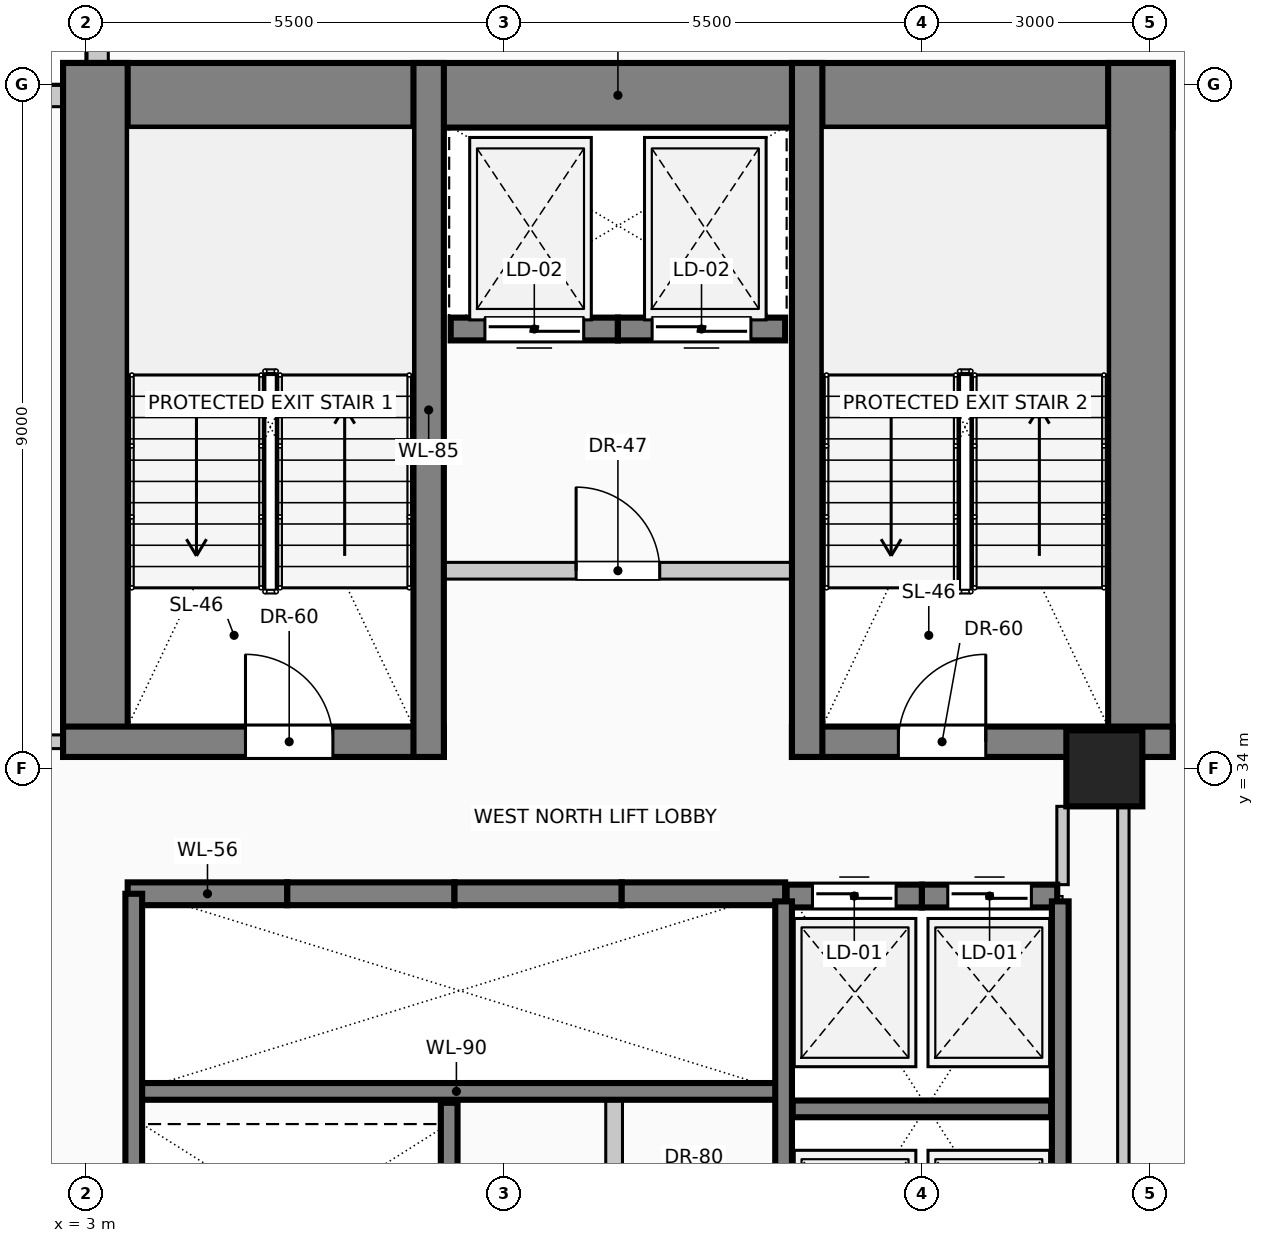
"""IFC4 building model, lengths in metres.
Left out: names, types, materials, properties, quantities, classifications, styles, units other than length and angle.
Written with IfcOpenShell. Run it as: python <this file> out.ifc"""

import sys

from ifc_helpers import new_model, si_unit, direction, frame, frame_2d, origin, origin_2d, place, context, subcontext, project, spatial, rectangle, circle, extrude, element, fill, save


model = new_model("IFC4")
c1 = context("Model", 3, precision=1e-05, world=origin(), true_north=direction((0.0, 1.0)))
c2 = subcontext(c1, "Body", "Model", "MODEL_VIEW")
j1 = project(units=[si_unit("LENGTHUNIT", "METRE"), si_unit("PLANEANGLEUNIT", "RADIAN")], contexts=[c1])
p1 = place(None, origin())
s1 = spatial("IfcSite", under=j1, at=p1, CompositionType="ELEMENT")
p2 = place(p1, origin())
s2 = spatial("IfcBuilding", under=s1, at=p2, CompositionType="ELEMENT")
p3 = place(p2, frame((0.0, 0.0, 148.6)))
s3 = spatial("IfcBuildingStorey", under=s2, at=p3, CompositionType="ELEMENT", Elevation=148.6)
p4 = place(p3, frame((2.7, 42.855, 0.0), z_axis=(0.0, 0.0, 1.0), x_axis=(1.0, 0.0, 0.0)))
e1 = element("IfcWall", 1, at=p4, inside=s3, PredefinedType="SHEAR", context=c2, shape_type="SweptSolid", body=[
    extrude(rectangle(XDim=14.6, YDim=0.85, at=frame_2d((7.3, 0.0))), origin(), (0.0, 0.0, 1.0), 4.0),
])
for number, where, z_axis, x_axis in (
    (2, (3.125, 34.15, 0.0), (0.0, 0.0, 1.0), (0.0, 1.0, 0.0)),
    (3, (16.875, 34.15, 0.0), (0.0, 0.0, 1.0), (0.0, 1.0, 0.0)),
):
    element("IfcWall", number, at=place(p3, frame(where, z_axis=z_axis, x_axis=x_axis)), inside=s3, PredefinedType="SHEAR", context=c2, shape_type="SweptSolid", body=[
        extrude(rectangle(XDim=9.13, YDim=0.85, at=frame_2d((4.565, 0.0))), origin(), (0.0, 0.0, 1.0), 4.0),
    ])
p5 = place(p3, frame((2.7, 34.35, 0.0), z_axis=(0.0, 0.0, 1.0), x_axis=(1.0, 0.0, 0.0)))
e4 = element("IfcWall", 4, at=p5, inside=s3, PredefinedType="SHEAR", context=c2, shape_type="SweptSolid", body=[
    extrude(rectangle(XDim=5.01, YDim=0.4, at=frame_2d((2.505, 0.0))), origin(), (0.0, 0.0, 1.0), 4.0),
])
p6 = place(p5, frame((2.4, 0.0, 0.0)))
e5 = element("IfcOpeningElement", 5, at=p6, cuts=e4, PredefinedType="OPENING", context=c2, shape_type="SweptSolid", body=[
    extrude(rectangle(XDim=1.15, YDim=2.2, at=frame_2d((0.575, 1.1))), frame((0.0, 0.21, 0.0), z_axis=(0.0, -1.0, 0.0), x_axis=(1.0, 0.0, 0.0)), (0.0, 0.0, 1.0), 0.42),
])
p7 = place(p3, frame((12.29, 34.35, 0.0), z_axis=(0.0, 0.0, 1.0), x_axis=(1.0, 0.0, 0.0)))
e6 = element("IfcWall", 6, at=p7, inside=s3, PredefinedType="SHEAR", context=c2, shape_type="SweptSolid", body=[
    extrude(rectangle(XDim=5.01, YDim=0.4, at=frame_2d((2.505, 0.0))), origin(), (0.0, 0.0, 1.0), 4.0),
])
p8 = place(p7, frame((1.4, 0.0, 0.0)))
e7 = element("IfcOpeningElement", 7, at=p8, cuts=e6, PredefinedType="OPENING", context=c2, shape_type="SweptSolid", body=[
    extrude(rectangle(XDim=1.15, YDim=2.2, at=frame_2d((0.575, 1.1))), frame((0.0, 0.21, 0.0), z_axis=(0.0, -1.0, 0.0), x_axis=(1.0, 0.0, 0.0)), (0.0, 0.0, 1.0), 0.42),
])
for number, where, z_axis, x_axis in (
    (8, (7.51, 34.15, 0.0), (0.0, 0.0, 1.0), (0.0, 1.0, 0.0)),
    (9, (12.49, 34.15, 0.0), (0.0, 0.0, 1.0), (0.0, 1.0, 0.0)),
):
    element("IfcWall", number, at=place(p3, frame(where, z_axis=z_axis, x_axis=x_axis)), inside=s3, PredefinedType="SHEAR", context=c2, shape_type="SweptSolid", body=[
        extrude(rectangle(XDim=9.13, YDim=0.4, at=frame_2d((4.565, 0.0))), origin(), (0.0, 0.0, 1.0), 4.0),
    ])
p9 = place(p3, frame((16.4, 34.0, 0.0), z_axis=(0.0, 0.0, 1.0), x_axis=(1.0, 0.0, 0.0)))
e10 = element("IfcColumn", 10, at=p9, inside=s3, PredefinedType="COLUMN", context=c2, shape_type="SweptSolid", body=[
    extrude(circle(Radius=0.5, at=origin_2d()), origin(), (0.0, 0.0, 1.0), 4.0),
])
p10 = place(p3, frame((0.6, 42.845, 0.0), z_axis=(0.0, 0.0, 1.0), x_axis=(1.0, 0.0, 0.0)))
e11 = element("IfcWall", 11, at=p10, inside=s3, PredefinedType="SOLIDWALL", context=c2, shape_type="SweptSolid", body=[
    extrude(rectangle(XDim=2.095, YDim=0.28, at=frame_2d((1.047, 0.0))), origin(), (0.0, 0.0, 1.0), 3.725),
])
p11 = place(p3, frame((3.155, 43.285, 0.0), z_axis=(0.0, 0.0, 1.0), x_axis=(0.0, 1.0, 0.0)))
e12 = element("IfcWall", 12, at=p11, inside=s3, PredefinedType="SOLIDWALL", context=c2, shape_type="SweptSolid", body=[
    extrude(rectangle(XDim=2.115, YDim=0.28, at=frame_2d((1.058, 0.0))), origin(), (0.0, 0.0, 1.0), 3.725),
])
p12 = place(p3, frame((12.22, 32.32, 0.0), z_axis=(0.0, 0.0, 1.0), x_axis=(1.0, 0.0, 0.0)))
e13 = element("IfcWall", 13, at=p12, inside=s3, PredefinedType="SOLIDWALL", context=c2, shape_type="SweptSolid", body=[
    extrude(rectangle(XDim=1.78, YDim=0.3, at=frame_2d((0.89, 0.0))), origin(), (0.0, 0.0, 1.0), 4.0),
])
p13 = place(p12, frame((0.34, 0.0, 0.0)))
e14 = element("IfcOpeningElement", 14, at=p13, cuts=e13, PredefinedType="OPENING", context=c2, shape_type="SweptSolid", body=[
    extrude(rectangle(XDim=1.1, YDim=2.2, at=frame_2d((0.55, 1.1))), frame((0.0, 0.16, 0.0), z_axis=(0.0, -1.0, 0.0), x_axis=(1.0, 0.0, 0.0)), (0.0, 0.0, 1.0), 0.32),
])
p14 = place(p3, frame((14.0, 32.32, 0.0), z_axis=(0.0, 0.0, 1.0), x_axis=(1.0, 0.0, 0.0)))
e15 = element("IfcWall", 15, at=p14, inside=s3, PredefinedType="SOLIDWALL", context=c2, shape_type="SweptSolid", body=[
    extrude(rectangle(XDim=1.78, YDim=0.3, at=frame_2d((0.89, 0.0))), origin(), (0.0, 0.0, 1.0), 4.0),
])
p15 = place(p14, frame((0.34, 0.0, 0.0)))
e16 = element("IfcOpeningElement", 16, at=p15, cuts=e15, PredefinedType="OPENING", context=c2, shape_type="SweptSolid", body=[
    extrude(rectangle(XDim=1.1, YDim=2.2, at=frame_2d((0.55, 1.1))), frame((0.0, 0.16, 0.0), z_axis=(0.0, -1.0, 0.0), x_axis=(1.0, 0.0, 0.0)), (0.0, 0.0, 1.0), 0.32),
])
p16 = place(p3, frame((3.55, 32.35, 0.0), z_axis=(0.0, 0.0, 1.0), x_axis=(1.0, 0.0, 0.0)))
e17 = element("IfcWall", 17, at=p16, inside=s3, PredefinedType="SOLIDWALL", context=c2, shape_type="SweptSolid", body=[
    extrude(rectangle(XDim=2.1, YDim=0.3, at=frame_2d((1.05, 0.0))), origin(), (0.0, 0.0, 1.0), 4.0),
])
p17 = place(p3, frame((5.65, 32.35, 0.0), z_axis=(0.0, 0.0, 1.0), x_axis=(1.0, 0.0, 0.0)))
e18 = element("IfcWall", 18, at=p17, inside=s3, PredefinedType="SOLIDWALL", context=c2, shape_type="SweptSolid", body=[
    extrude(rectangle(XDim=2.2, YDim=0.3, at=frame_2d((1.1, 0.0))), origin(), (0.0, 0.0, 1.0), 4.0),
])
p18 = place(p3, frame((7.85, 32.35, 0.0), z_axis=(0.0, 0.0, 1.0), x_axis=(1.0, 0.0, 0.0)))
e19 = element("IfcWall", 19, at=p18, inside=s3, PredefinedType="SOLIDWALL", context=c2, shape_type="SweptSolid", body=[
    extrude(rectangle(XDim=2.2, YDim=0.3, at=frame_2d((1.1, 0.0))), origin(), (0.0, 0.0, 1.0), 4.0),
])
p19 = place(p3, frame((10.05, 32.35, 0.0), z_axis=(0.0, 0.0, 1.0), x_axis=(1.0, 0.0, 0.0)))
e20 = element("IfcWall", 20, at=p19, inside=s3, PredefinedType="SOLIDWALL", context=c2, shape_type="SweptSolid", body=[
    extrude(rectangle(XDim=2.15, YDim=0.3, at=frame_2d((1.075, 0.0))), origin(), (0.0, 0.0, 1.0), 4.0),
])
p20 = place(p3, frame((10.0, 39.78, 0.0), z_axis=(0.0, 0.0, 1.0), x_axis=(-1.0, 0.0, 0.0)))
e21 = element("IfcWall", 21, at=p20, inside=s3, PredefinedType="SOLIDWALL", context=c2, shape_type="SweptSolid", body=[
    extrude(rectangle(XDim=2.2, YDim=0.3, at=frame_2d((1.1, 0.0))), origin(), (0.0, 0.0, 1.0), 4.0),
])
p21 = place(p20, frame((0.45, 0.0, 0.0)))
e22 = element("IfcOpeningElement", 22, at=p21, cuts=e21, PredefinedType="OPENING", context=c2, shape_type="SweptSolid", body=[
    extrude(rectangle(XDim=1.3, YDim=2.25, at=frame_2d((0.65, 1.125))), frame((0.0, 0.16, 0.0), z_axis=(0.0, -1.0, 0.0), x_axis=(1.0, 0.0, 0.0)), (0.0, 0.0, 1.0), 0.32),
])
p22 = place(p3, frame((12.2, 39.78, 0.0), z_axis=(0.0, 0.0, 1.0), x_axis=(-1.0, 0.0, 0.0)))
e23 = element("IfcWall", 23, at=p22, inside=s3, PredefinedType="SOLIDWALL", context=c2, shape_type="SweptSolid", body=[
    extrude(rectangle(XDim=2.2, YDim=0.3, at=frame_2d((1.1, 0.0))), origin(), (0.0, 0.0, 1.0), 4.0),
])
p23 = place(p22, frame((0.45, 0.0, 0.0)))
e24 = element("IfcOpeningElement", 24, at=p23, cuts=e23, PredefinedType="OPENING", context=c2, shape_type="SweptSolid", body=[
    extrude(rectangle(XDim=1.3, YDim=2.25, at=frame_2d((0.65, 1.125))), frame((0.0, 0.16, 0.0), z_axis=(0.0, -1.0, 0.0), x_axis=(1.0, 0.0, 0.0)), (0.0, 0.0, 1.0), 0.32),
])
p24 = place(p3, frame((3.55, 29.75, 0.0), z_axis=(0.0, 0.0, 1.0), x_axis=(1.0, 0.0, 0.0)))
e25 = element("IfcWall", 25, at=p24, inside=s3, PredefinedType="SOLIDWALL", context=c2, shape_type="SweptSolid", body=[
    extrude(rectangle(XDim=8.65, YDim=0.22, at=frame_2d((4.325, 0.0))), origin(), (0.0, 0.0, 1.0), 4.0),
])
p25 = place(p3, frame((3.63, 26.8, 0.0), z_axis=(0.0, 0.0, 1.0), x_axis=(0.0, 1.0, 0.0)))
e26 = element("IfcWall", 26, at=p25, inside=s3, PredefinedType="SOLIDWALL", context=c2, shape_type="SweptSolid", body=[
    extrude(rectangle(XDim=5.55, YDim=0.22, at=frame_2d((2.775, 0.0))), origin(), (0.0, 0.0, 1.0), 4.0),
])
p26 = place(p3, frame((7.78, 26.8, 0.0), z_axis=(0.0, 0.0, 1.0), x_axis=(0.0, 1.0, 0.0)))
e27 = element("IfcWall", 27, at=p26, inside=s3, PredefinedType="SOLIDWALL", context=c2, shape_type="SweptSolid", body=[
    extrude(rectangle(XDim=2.8, YDim=0.22, at=frame_2d((1.4, 0.0))), origin(), (0.0, 0.0, 1.0), 4.0),
])
for number, where, z_axis, x_axis in (
    (28, (12.18, 26.8, 0.0), (0.0, 0.0, 1.0), (0.0, 1.0, 0.0)),
    (29, (15.82, 26.8, 0.0), (0.0, 0.0, 1.0), (0.0, 1.0, 0.0)),
):
    element("IfcWall", number, at=place(p3, frame(where, z_axis=z_axis, x_axis=x_axis)), inside=s3, PredefinedType="SOLIDWALL", context=c2, shape_type="SweptSolid", body=[
        extrude(rectangle(XDim=5.45, YDim=0.22, at=frame_2d((2.725, 0.0))), origin(), (0.0, 0.0, 1.0), 4.0),
    ])
p27 = place(p3, frame((12.3, 29.52, 0.0), z_axis=(0.0, 0.0, 1.0), x_axis=(1.0, 0.0, 0.0)))
e30 = element("IfcWall", 30, at=p27, inside=s3, PredefinedType="SOLIDWALL", context=c2, shape_type="SweptSolid", body=[
    extrude(rectangle(XDim=3.4, YDim=0.22, at=frame_2d((1.7, 0.0))), origin(), (0.0, 0.0, 1.0), 4.0),
])
p28 = place(p3, frame((7.51, 36.6, 0.0), z_axis=(0.0, 0.0, 1.0), x_axis=(1.0, 0.0, 0.0)))
e31 = element("IfcWall", 31, at=p28, inside=s3, PredefinedType="PARTITIONING", context=c2, shape_type="SweptSolid", body=[
    extrude(rectangle(XDim=4.98, YDim=0.22, at=frame_2d((2.49, 0.0))), origin(), (0.0, 0.0, 1.0), 3.725),
])
p29 = place(p28, frame((1.94, 0.0, 0.0)))
e32 = element("IfcOpeningElement", 32, at=p29, cuts=e31, PredefinedType="OPENING", context=c2, shape_type="SweptSolid", body=[
    extrude(rectangle(XDim=1.1, YDim=2.2, at=frame_2d((0.55, 1.1))), frame((0.0, 0.12, 0.0), z_axis=(0.0, -1.0, 0.0), x_axis=(1.0, 0.0, 0.0)), (0.0, 0.0, 1.0), 0.24),
])
p30 = place(p3, frame((1.175, 34.35, 0.0), z_axis=(0.0, 0.0, 1.0), x_axis=(1.0, 0.0, 0.0)))
e33 = element("IfcWall", 33, at=p30, inside=s3, PredefinedType="PARTITIONING", context=c2, shape_type="SweptSolid", body=[
    extrude(rectangle(XDim=1.525, YDim=0.18, at=frame_2d((0.762, 0.0))), origin(), (0.0, 0.0, 1.0), 3.725),
])
p31 = place(p3, frame((9.95, 26.91, 0.0), z_axis=(0.0, 0.0, 1.0), x_axis=(0.0, 1.0, 0.0)))
e34 = element("IfcWall", 34, at=p31, inside=s3, PredefinedType="PARTITIONING", context=c2, shape_type="SweptSolid", body=[
    extrude(rectangle(XDim=2.73, YDim=0.22, at=frame_2d((1.365, 0.0))), origin(), (0.0, 0.0, 1.0), 3.725),
])
p32 = place(p3, frame((15.85, 32.47, 0.0), z_axis=(0.0, 0.0, 1.0), x_axis=(0.0, 1.0, 0.0)))
e35 = element("IfcWall", 35, at=p32, inside=s3, PredefinedType="PARTITIONING", context=c2, shape_type="SweptSolid", body=[
    extrude(rectangle(XDim=1.03, YDim=0.15, at=frame_2d((0.515, 0.0))), origin(), (0.0, 0.0, 1.0), 3.725),
])
p33 = place(p3, frame((16.65, 25.075, 0.0), z_axis=(0.0, 0.0, 1.0), x_axis=(0.0, 1.0, 0.0)))
e36 = element("IfcWall", 36, at=p33, inside=s3, PredefinedType="PARTITIONING", context=c2, shape_type="SweptSolid", body=[
    extrude(rectangle(XDim=8.425, YDim=0.15, at=frame_2d((4.212, 0.0))), origin(), (0.0, 0.0, 1.0), 3.07),
])
p34 = place(p13, origin())
e37 = element("IfcDoor", 37, at=p34, inside=s3, OperationType="SLIDING_TO_LEFT", PredefinedType="DOOR", context=c2, shape_type="SweptSolid", body=[
    extrude(rectangle(XDim=1.1, YDim=2.2, at=frame_2d((0.55, 1.1))), frame((0.0, 0.025, 0.0), z_axis=(0.0, -1.0, 0.0), x_axis=(1.0, 0.0, 0.0)), (0.0, 0.0, 1.0), 0.05),
])
fill(e14, e37)
p35 = place(p15, origin())
e38 = element("IfcDoor", 38, at=p35, inside=s3, OperationType="SLIDING_TO_RIGHT", PredefinedType="DOOR", context=c2, shape_type="SweptSolid", body=[
    extrude(rectangle(XDim=1.1, YDim=2.2, at=frame_2d((0.55, 1.1))), frame((0.0, 0.025, 0.0), z_axis=(0.0, -1.0, 0.0), x_axis=(1.0, 0.0, 0.0)), (0.0, 0.0, 1.0), 0.05),
])
fill(e16, e38)
p36 = place(p21, origin())
e39 = element("IfcDoor", 39, at=p36, inside=s3, OperationType="SLIDING_TO_LEFT", PredefinedType="DOOR", context=c2, shape_type="SweptSolid", body=[
    extrude(rectangle(XDim=1.3, YDim=2.25, at=frame_2d((0.65, 1.125))), frame((0.0, 0.025, 0.0), z_axis=(0.0, -1.0, 0.0), x_axis=(1.0, 0.0, 0.0)), (0.0, 0.0, 1.0), 0.05),
])
fill(e22, e39)
p37 = place(p23, origin())
e40 = element("IfcDoor", 40, at=p37, inside=s3, OperationType="SLIDING_TO_RIGHT", PredefinedType="DOOR", context=c2, shape_type="SweptSolid", body=[
    extrude(rectangle(XDim=1.3, YDim=2.25, at=frame_2d((0.65, 1.125))), frame((0.0, 0.025, 0.0), z_axis=(0.0, -1.0, 0.0), x_axis=(1.0, 0.0, 0.0)), (0.0, 0.0, 1.0), 0.05),
])
fill(e24, e40)
p38 = place(p6, origin())
e41 = element("IfcDoor", 41, at=p38, inside=s3, OperationType="SINGLE_SWING_LEFT", PredefinedType="DOOR", context=c2, shape_type="SweptSolid", body=[
    extrude(rectangle(XDim=1.15, YDim=2.2, at=frame_2d((0.575, 1.1))), frame((0.0, 0.025, 0.0), z_axis=(0.0, -1.0, 0.0), x_axis=(1.0, 0.0, 0.0)), (0.0, 0.0, 1.0), 0.05),
])
fill(e5, e41)
p39 = place(p8, origin())
e42 = element("IfcDoor", 42, at=p39, inside=s3, OperationType="SINGLE_SWING_RIGHT", PredefinedType="DOOR", context=c2, shape_type="SweptSolid", body=[
    extrude(rectangle(XDim=1.15, YDim=2.2, at=frame_2d((0.575, 1.1))), frame((0.0, 0.025, 0.0), z_axis=(0.0, -1.0, 0.0), x_axis=(1.0, 0.0, 0.0)), (0.0, 0.0, 1.0), 0.05),
])
fill(e7, e42)
p40 = place(p29, origin())
e43 = element("IfcDoor", 43, at=p40, inside=s3, OperationType="SINGLE_SWING_LEFT", PredefinedType="DOOR", context=c2, shape_type="SweptSolid", body=[
    extrude(rectangle(XDim=1.1, YDim=2.2, at=frame_2d((0.55, 1.1))), frame((0.0, 0.025, 0.0), z_axis=(0.0, -1.0, 0.0), x_axis=(1.0, 0.0, 0.0)), (0.0, 0.0, 1.0), 0.05),
])
fill(e32, e43)
save(model, sys.argv[1])
